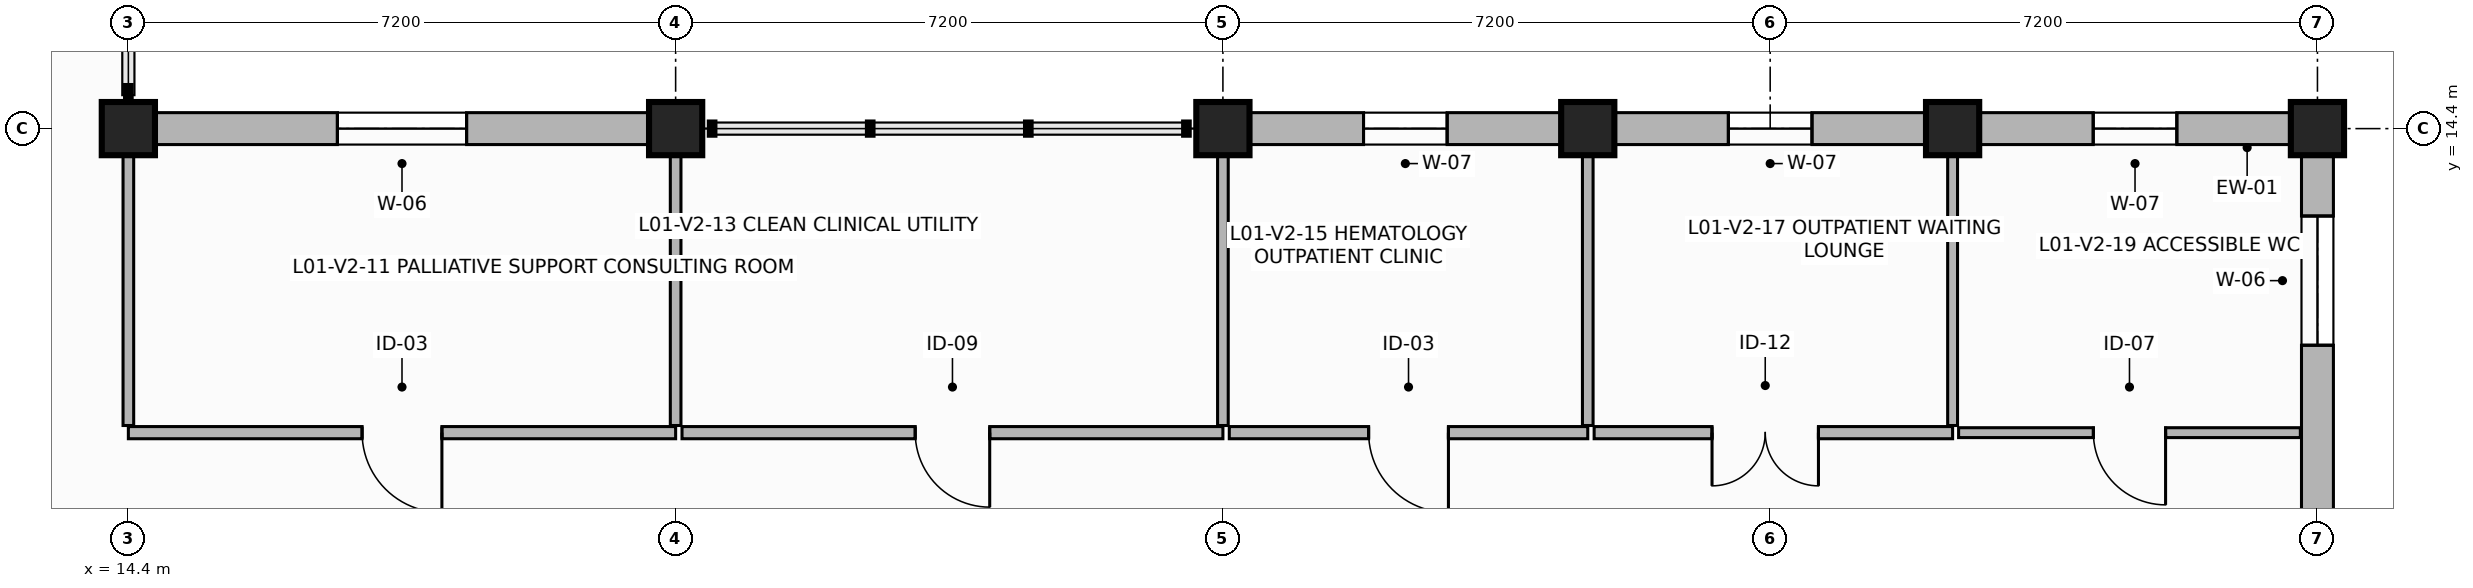
"""IFC4 building model, lengths in metres.
Left out: names, types, materials, properties, quantities, classifications, styles, units other than length and angle.
Written with IfcOpenShell. Run it as: python <this file> out.ifc"""

import sys

from ifc_helpers import new_model, si_unit, direction, frame, frame_2d, origin, origin_2d, place, context, subcontext, project, spatial, rectangle, extrude, element, fill, save


model = new_model("IFC4")
c1 = context("Model", 3, precision=1e-05, world=origin(), true_north=direction((0.0, 1.0)))
c2 = subcontext(c1, "Body", "Model", "MODEL_VIEW")
j1 = project(units=[si_unit("LENGTHUNIT", "METRE"), si_unit("PLANEANGLEUNIT", "RADIAN")], contexts=[c1])
p1 = place(None, origin())
s1 = spatial("IfcSite", under=j1, at=p1, CompositionType="ELEMENT")
p2 = place(p1, origin())
s2 = spatial("IfcBuilding", under=s1, at=p2, CompositionType="ELEMENT")
p3 = place(p2, frame((0.0, 0.0, 4.5)))
s3 = spatial("IfcBuildingStorey", under=s2, at=p3, CompositionType="ELEMENT", Elevation=4.5)
for number, where, z_axis, x_axis in (
    (1, (14.4, 14.4, 0.0), (0.0, 0.0, 1.0), (1.0, 0.0, 0.0)),
    (2, (21.6, 14.4, 0.0), (0.0, 0.0, 1.0), (1.0, 0.0, 0.0)),
    (3, (28.8, 14.4, 0.0), (0.0, 0.0, 1.0), (1.0, 0.0, 0.0)),
    (4, (33.6, 14.4, 0.0), (0.0, 0.0, 1.0), (1.0, 0.0, 0.0)),
    (5, (38.4, 14.4, 0.0), (0.0, 0.0, 1.0), (1.0, 0.0, 0.0)),
    (6, (43.2, 14.4, 0.0), (0.0, 0.0, 1.0), (1.0, 0.0, 0.0)),
):
    element("IfcColumn", number, at=place(p3, frame(where, z_axis=z_axis, x_axis=x_axis)), inside=s3, PredefinedType="COLUMN", context=c2, shape_type="SweptSolid", body=[
        extrude(rectangle(XDim=0.7, YDim=0.7, at=origin_2d()), origin(), (0.0, 0.0, 1.0), 3.62),
    ])
p4 = place(p3, frame((43.2, 7.2, 0.0), z_axis=(0.0, 0.0, 1.0), x_axis=(0.0, 1.0, 0.0)))
e7 = element("IfcWall", 7, at=p4, inside=s3, PredefinedType="SOLIDWALL", context=c2, shape_type="SweptSolid", body=[
    extrude(rectangle(XDim=7.2, YDim=0.42, at=frame_2d((3.6, 0.0))), origin(), (0.0, 0.0, 1.0), 3.0),
])
p5 = place(p4, frame((4.35, 0.0, 0.85)))
e8 = element("IfcOpeningElement", 8, at=p5, cuts=e7, PredefinedType="OPENING", context=c2, shape_type="SweptSolid", body=[
    extrude(rectangle(XDim=1.7, YDim=1.9, at=frame_2d((0.85, 0.95))), frame((0.0, 0.22, 0.0), z_axis=(0.0, -1.0, 0.0), x_axis=(1.0, 0.0, 0.0)), (0.0, 0.0, 1.0), 0.44),
])
p6 = place(p3, frame((43.2, 14.4, 0.0), z_axis=(0.0, 0.0, 1.0), x_axis=(-1.0, 0.0, 0.0)))
e9 = element("IfcWall", 9, at=p6, inside=s3, PredefinedType="SOLIDWALL", context=c2, shape_type="SweptSolid", body=[
    extrude(rectangle(XDim=4.8, YDim=0.42, at=frame_2d((2.4, 0.0))), origin(), (0.0, 0.0, 1.0), 3.0),
])
p7 = place(p6, frame((1.85, 0.0, 0.85)))
e10 = element("IfcOpeningElement", 10, at=p7, cuts=e9, PredefinedType="OPENING", context=c2, shape_type="SweptSolid", body=[
    extrude(rectangle(XDim=1.1, YDim=1.85, at=frame_2d((0.55, 0.925))), frame((0.0, 0.22, 0.0), z_axis=(0.0, -1.0, 0.0), x_axis=(1.0, 0.0, 0.0)), (0.0, 0.0, 1.0), 0.44),
])
p8 = place(p3, frame((38.4, 14.4, 0.0), z_axis=(0.0, 0.0, 1.0), x_axis=(-1.0, 0.0, 0.0)))
e11 = element("IfcWall", 11, at=p8, inside=s3, PredefinedType="SOLIDWALL", context=c2, shape_type="SweptSolid", body=[
    extrude(rectangle(XDim=4.8, YDim=0.42, at=frame_2d((2.4, 0.0))), origin(), (0.0, 0.0, 1.0), 3.0),
])
p9 = place(p8, frame((1.85, 0.0, 0.85)))
e12 = element("IfcOpeningElement", 12, at=p9, cuts=e11, PredefinedType="OPENING", context=c2, shape_type="SweptSolid", body=[
    extrude(rectangle(XDim=1.1, YDim=1.85, at=frame_2d((0.55, 0.925))), frame((0.0, 0.22, 0.0), z_axis=(0.0, -1.0, 0.0), x_axis=(1.0, 0.0, 0.0)), (0.0, 0.0, 1.0), 0.44),
])
p10 = place(p3, frame((33.6, 14.4, 0.0), z_axis=(0.0, 0.0, 1.0), x_axis=(-1.0, 0.0, 0.0)))
e13 = element("IfcWall", 13, at=p10, inside=s3, PredefinedType="SOLIDWALL", context=c2, shape_type="SweptSolid", body=[
    extrude(rectangle(XDim=4.8, YDim=0.42, at=frame_2d((2.4, 0.0))), origin(), (0.0, 0.0, 1.0), 3.0),
])
p11 = place(p10, frame((1.85, 0.0, 0.85)))
e14 = element("IfcOpeningElement", 14, at=p11, cuts=e13, PredefinedType="OPENING", context=c2, shape_type="SweptSolid", body=[
    extrude(rectangle(XDim=1.1, YDim=1.85, at=frame_2d((0.55, 0.925))), frame((0.0, 0.22, 0.0), z_axis=(0.0, -1.0, 0.0), x_axis=(1.0, 0.0, 0.0)), (0.0, 0.0, 1.0), 0.44),
])
p12 = place(p3, frame((21.6, 14.4, 0.0), z_axis=(0.0, 0.0, 1.0), x_axis=(-1.0, 0.0, 0.0)))
e15 = element("IfcWall", 15, at=p12, inside=s3, PredefinedType="SOLIDWALL", context=c2, shape_type="SweptSolid", body=[
    extrude(rectangle(XDim=7.2, YDim=0.42, at=frame_2d((3.6, 0.0))), origin(), (0.0, 0.0, 1.0), 3.0),
])
p13 = place(p12, frame((2.75, 0.0, 0.85)))
e16 = element("IfcOpeningElement", 16, at=p13, cuts=e15, PredefinedType="OPENING", context=c2, shape_type="SweptSolid", body=[
    extrude(rectangle(XDim=1.7, YDim=1.9, at=frame_2d((0.85, 0.95))), frame((0.0, 0.22, 0.0), z_axis=(0.0, -1.0, 0.0), x_axis=(1.0, 0.0, 0.0)), (0.0, 0.0, 1.0), 0.44),
])
p14 = place(p3, frame((21.6, 10.4, 0.0), z_axis=(0.0, 0.0, 1.0), x_axis=(-1.0, 0.0, 0.0)))
e17 = element("IfcWall", 17, at=p14, inside=s3, PredefinedType="PARTITIONING", context=c2, shape_type="SweptSolid", body=[
    extrude(rectangle(XDim=7.2, YDim=0.16, at=frame_2d((3.6, 0.0))), origin(), (0.0, 0.0, 1.0), 2.98),
])
p15 = place(p14, frame((3.075, 0.0, 0.0)))
e18 = element("IfcOpeningElement", 18, at=p15, cuts=e17, PredefinedType="OPENING", context=c2, shape_type="SweptSolid", body=[
    extrude(rectangle(XDim=1.05, YDim=2.15, at=frame_2d((0.525, 1.075))), frame((0.0, 0.09, 0.0), z_axis=(0.0, -1.0, 0.0), x_axis=(1.0, 0.0, 0.0)), (0.0, 0.0, 1.0), 0.18),
])
for number, where, z_axis, x_axis in (
    (19, (14.4, 10.494, 0.0), (0.0, 0.0, 1.0), (0.0, 1.0, 0.0)),
    (20, (21.6, 14.175, 0.0), (0.0, 0.0, 1.0), (0.0, -1.0, 0.0)),
):
    element("IfcWall", number, at=place(p3, frame(where, z_axis=z_axis, x_axis=x_axis)), inside=s3, PredefinedType="PARTITIONING", context=c2, shape_type="SweptSolid", body=[
        extrude(rectangle(XDim=3.681, YDim=0.14, at=frame_2d((1.841, 0.0))), origin(), (0.0, 0.0, 1.0), 2.98),
    ])
p16 = place(p3, frame((28.8, 10.4, 0.0), z_axis=(0.0, 0.0, 1.0), x_axis=(-1.0, 0.0, 0.0)))
e21 = element("IfcWall", 21, at=p16, inside=s3, PredefinedType="PARTITIONING", context=c2, shape_type="SweptSolid", body=[
    extrude(rectangle(XDim=7.116, YDim=0.16, at=frame_2d((3.558, 0.0))), origin(), (0.0, 0.0, 1.0), 2.98),
])
p17 = place(p16, frame((3.068, 0.0, 0.0)))
e22 = element("IfcOpeningElement", 22, at=p17, cuts=e21, PredefinedType="OPENING", context=c2, shape_type="SweptSolid", body=[
    extrude(rectangle(XDim=0.98, YDim=2.15, at=frame_2d((0.49, 1.075))), frame((0.0, 0.09, 0.0), z_axis=(0.0, -1.0, 0.0), x_axis=(1.0, 0.0, 0.0)), (0.0, 0.0, 1.0), 0.18),
])
p18 = place(p3, frame((28.8, 14.175, 0.0), z_axis=(0.0, 0.0, 1.0), x_axis=(0.0, -1.0, 0.0)))
e23 = element("IfcWall", 23, at=p18, inside=s3, PredefinedType="PARTITIONING", context=c2, shape_type="SweptSolid", body=[
    extrude(rectangle(XDim=3.681, YDim=0.14, at=frame_2d((1.841, 0.0))), origin(), (0.0, 0.0, 1.0), 2.98),
])
p19 = place(p3, frame((33.6, 10.4, 0.0), z_axis=(0.0, 0.0, 1.0), x_axis=(-1.0, 0.0, 0.0)))
e24 = element("IfcWall", 24, at=p19, inside=s3, PredefinedType="PARTITIONING", context=c2, shape_type="SweptSolid", body=[
    extrude(rectangle(XDim=4.716, YDim=0.16, at=frame_2d((2.358, 0.0))), origin(), (0.0, 0.0, 1.0), 2.98),
])
p20 = place(p19, frame((1.833, 0.0, 0.0)))
e25 = element("IfcOpeningElement", 25, at=p20, cuts=e24, PredefinedType="OPENING", context=c2, shape_type="SweptSolid", body=[
    extrude(rectangle(XDim=1.05, YDim=2.15, at=frame_2d((0.525, 1.075))), frame((0.0, 0.09, 0.0), z_axis=(0.0, -1.0, 0.0), x_axis=(1.0, 0.0, 0.0)), (0.0, 0.0, 1.0), 0.18),
])
p21 = place(p3, frame((33.6, 14.175, 0.0), z_axis=(0.0, 0.0, 1.0), x_axis=(0.0, -1.0, 0.0)))
e26 = element("IfcWall", 26, at=p21, inside=s3, PredefinedType="PARTITIONING", context=c2, shape_type="SweptSolid", body=[
    extrude(rectangle(XDim=3.681, YDim=0.14, at=frame_2d((1.841, 0.0))), origin(), (0.0, 0.0, 1.0), 2.98),
])
p22 = place(p3, frame((38.4, 10.4, 0.0), z_axis=(0.0, 0.0, 1.0), x_axis=(-1.0, 0.0, 0.0)))
e27 = element("IfcWall", 27, at=p22, inside=s3, PredefinedType="PARTITIONING", context=c2, shape_type="SweptSolid", body=[
    extrude(rectangle(XDim=4.716, YDim=0.16, at=frame_2d((2.358, 0.0))), origin(), (0.0, 0.0, 1.0), 2.98),
])
p23 = place(p22, frame((1.765, 0.0, 0.0)))
e28 = element("IfcOpeningElement", 28, at=p23, cuts=e27, PredefinedType="OPENING", context=c2, shape_type="SweptSolid", body=[
    extrude(rectangle(XDim=1.4, YDim=2.3, at=frame_2d((0.7, 1.15))), frame((0.0, 0.09, 0.0), z_axis=(0.0, -1.0, 0.0), x_axis=(1.0, 0.0, 0.0)), (0.0, 0.0, 1.0), 0.18),
])
p24 = place(p3, frame((38.4, 14.175, 0.0), z_axis=(0.0, 0.0, 1.0), x_axis=(0.0, -1.0, 0.0)))
e29 = element("IfcWall", 29, at=p24, inside=s3, PredefinedType="PARTITIONING", context=c2, shape_type="SweptSolid", body=[
    extrude(rectangle(XDim=3.681, YDim=0.13, at=frame_2d((1.841, 0.0))), origin(), (0.0, 0.0, 1.0), 2.98),
])
p25 = place(p3, frame((42.975, 10.4, 0.0), z_axis=(0.0, 0.0, 1.0), x_axis=(-1.0, 0.0, 0.0)))
e30 = element("IfcWall", 30, at=p25, inside=s3, PredefinedType="PARTITIONING", context=c2, shape_type="SweptSolid", body=[
    extrude(rectangle(XDim=4.496, YDim=0.13, at=frame_2d((2.248, 0.0))), origin(), (0.0, 0.0, 1.0), 2.98),
])
p26 = place(p25, frame((1.773, 0.0, 0.0)))
e31 = element("IfcOpeningElement", 31, at=p26, cuts=e30, PredefinedType="OPENING", context=c2, shape_type="SweptSolid", body=[
    extrude(rectangle(XDim=0.95, YDim=2.1, at=frame_2d((0.475, 1.05))), frame((0.0, 0.075, 0.0), z_axis=(0.0, -1.0, 0.0), x_axis=(1.0, 0.0, 0.0)), (0.0, 0.0, 1.0), 0.15),
])
p27 = place(p5, origin())
e32 = element("IfcWindow", 32, at=p27, inside=s3, PartitioningType="SINGLE_PANEL", PredefinedType="WINDOW", context=c2, shape_type="SweptSolid", body=[
    extrude(rectangle(XDim=1.7, YDim=1.9, at=frame_2d((0.85, 0.95))), frame((0.0, 0.03, 0.0), z_axis=(0.0, -1.0, 0.0), x_axis=(1.0, 0.0, 0.0)), (0.0, 0.0, 1.0), 0.06),
])
fill(e8, e32)
p28 = place(p7, origin())
e33 = element("IfcWindow", 33, at=p28, inside=s3, PartitioningType="SINGLE_PANEL", PredefinedType="WINDOW", context=c2, shape_type="SweptSolid", body=[
    extrude(rectangle(XDim=1.1, YDim=1.85, at=frame_2d((0.55, 0.925))), frame((0.0, 0.03, 0.0), z_axis=(0.0, -1.0, 0.0), x_axis=(1.0, 0.0, 0.0)), (0.0, 0.0, 1.0), 0.06),
])
fill(e10, e33)
p29 = place(p9, origin())
e34 = element("IfcWindow", 34, at=p29, inside=s3, PartitioningType="SINGLE_PANEL", PredefinedType="WINDOW", context=c2, shape_type="SweptSolid", body=[
    extrude(rectangle(XDim=1.1, YDim=1.85, at=frame_2d((0.55, 0.925))), frame((0.0, 0.03, 0.0), z_axis=(0.0, -1.0, 0.0), x_axis=(1.0, 0.0, 0.0)), (0.0, 0.0, 1.0), 0.06),
])
fill(e12, e34)
p30 = place(p11, origin())
e35 = element("IfcWindow", 35, at=p30, inside=s3, PartitioningType="SINGLE_PANEL", PredefinedType="WINDOW", context=c2, shape_type="SweptSolid", body=[
    extrude(rectangle(XDim=1.1, YDim=1.85, at=frame_2d((0.55, 0.925))), frame((0.0, 0.03, 0.0), z_axis=(0.0, -1.0, 0.0), x_axis=(1.0, 0.0, 0.0)), (0.0, 0.0, 1.0), 0.06),
])
fill(e14, e35)
p31 = place(p13, origin())
e36 = element("IfcWindow", 36, at=p31, inside=s3, PartitioningType="SINGLE_PANEL", PredefinedType="WINDOW", context=c2, shape_type="SweptSolid", body=[
    extrude(rectangle(XDim=1.7, YDim=1.9, at=frame_2d((0.85, 0.95))), frame((0.0, 0.03, 0.0), z_axis=(0.0, -1.0, 0.0), x_axis=(1.0, 0.0, 0.0)), (0.0, 0.0, 1.0), 0.06),
])
fill(e16, e36)
p32 = place(p15, origin())
e37 = element("IfcDoor", 37, at=p32, inside=s3, OperationType="SINGLE_SWING_LEFT", PredefinedType="DOOR", context=c2, shape_type="SweptSolid", body=[
    extrude(rectangle(XDim=1.05, YDim=2.15, at=frame_2d((0.525, 1.075))), frame((0.0, 0.025, 0.0), z_axis=(0.0, -1.0, 0.0), x_axis=(1.0, 0.0, 0.0)), (0.0, 0.0, 1.0), 0.05),
])
fill(e18, e37)
p33 = place(p17, origin())
e38 = element("IfcDoor", 38, at=p33, inside=s3, OperationType="SINGLE_SWING_LEFT", PredefinedType="DOOR", context=c2, shape_type="SweptSolid", body=[
    extrude(rectangle(XDim=0.98, YDim=2.15, at=frame_2d((0.49, 1.075))), frame((0.0, 0.025, 0.0), z_axis=(0.0, -1.0, 0.0), x_axis=(1.0, 0.0, 0.0)), (0.0, 0.0, 1.0), 0.05),
])
fill(e22, e38)
p34 = place(p20, origin())
e39 = element("IfcDoor", 39, at=p34, inside=s3, OperationType="SINGLE_SWING_LEFT", PredefinedType="DOOR", context=c2, shape_type="SweptSolid", body=[
    extrude(rectangle(XDim=1.05, YDim=2.15, at=frame_2d((0.525, 1.075))), frame((0.0, 0.025, 0.0), z_axis=(0.0, -1.0, 0.0), x_axis=(1.0, 0.0, 0.0)), (0.0, 0.0, 1.0), 0.05),
])
fill(e25, e39)
p35 = place(p23, origin())
e40 = element("IfcDoor", 40, at=p35, inside=s3, OperationType="DOUBLE_DOOR_SINGLE_SWING", PredefinedType="DOOR", context=c2, shape_type="SweptSolid", body=[
    extrude(rectangle(XDim=1.4, YDim=2.3, at=frame_2d((0.7, 1.15))), frame((0.0, 0.025, 0.0), z_axis=(0.0, -1.0, 0.0), x_axis=(1.0, 0.0, 0.0)), (0.0, 0.0, 1.0), 0.05),
])
fill(e28, e40)
p36 = place(p26, origin())
e41 = element("IfcDoor", 41, at=p36, inside=s3, OperationType="SINGLE_SWING_LEFT", PredefinedType="DOOR", context=c2, shape_type="SweptSolid", body=[
    extrude(rectangle(XDim=0.95, YDim=2.1, at=frame_2d((0.475, 1.05))), frame((0.0, 0.025, 0.0), z_axis=(0.0, -1.0, 0.0), x_axis=(1.0, 0.0, 0.0)), (0.0, 0.0, 1.0), 0.05),
])
fill(e31, e41)
save(model, sys.argv[1])
